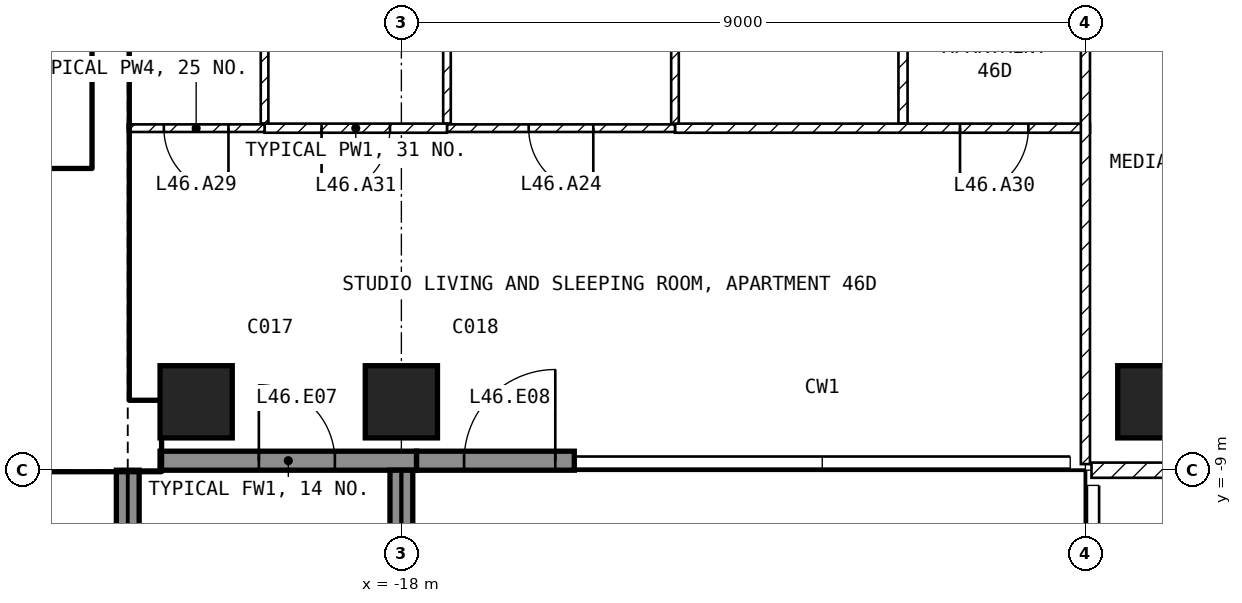
"""IFC4 building model, lengths in metres.
Left out: names, types, materials, properties, quantities, classifications, styles, units other than length and angle.
Written with IfcOpenShell. Run it as: python <this file> out.ifc"""

import sys

from ifc_helpers import new_model, si_unit, direction, frame, frame_2d, origin, origin_2d, place, context, subcontext, project, spatial, rectangle, extrude, element, fill, save


model = new_model("IFC4")
c1 = context("Model", 3, precision=1e-05, world=origin(), true_north=direction((0.0, 1.0)))
c2 = subcontext(c1, "Body", "Model", "MODEL_VIEW")
j1 = project(units=[si_unit("LENGTHUNIT", "METRE"), si_unit("PLANEANGLEUNIT", "RADIAN")], contexts=[c1])
p1 = place(None, origin())
s1 = spatial("IfcSite", under=j1, at=p1, CompositionType="ELEMENT")
p2 = place(p1, origin())
s2 = spatial("IfcBuilding", under=s1, at=p2, CompositionType="ELEMENT")
p3 = place(p2, frame((0.0, 0.0, 187.6)))
s3 = spatial("IfcBuildingStorey", under=s2, at=p3, CompositionType="ELEMENT", Elevation=187.6)
for number, where, z_axis, x_axis in (
    (1, (-20.7, -8.1, -0.25), (0.0, 0.0, 1.0), (1.0, 0.0, 0.0)),
    (2, (-18.0, -8.1, -0.25), (0.0, 0.0, 1.0), (1.0, 0.0, 0.0)),
    (3, (-8.1, -8.1, -0.25), (0.0, 0.0, 1.0), (1.0, 0.0, 0.0)),
):
    element("IfcColumn", number, at=place(p3, frame(where, z_axis=z_axis, x_axis=x_axis)), inside=s3, PredefinedType="COLUMN", context=c2, shape_type="SweptSolid", body=[
        extrude(rectangle(XDim=0.95, YDim=0.95, at=origin_2d()), origin(), (0.0, 0.0, 1.0), 3.5),
    ])
p4 = place(p3, frame((-21.175, -8.875, 0.0), z_axis=(0.0, 0.0, 1.0), x_axis=(1.0, 0.0, 0.0)))
e4 = element("IfcWall", 4, at=p4, inside=s3, PredefinedType="SOLIDWALL", context=c2, shape_type="SweptSolid", body=[
    extrude(rectangle(XDim=3.375, YDim=0.25, at=frame_2d((1.688, 0.0))), origin(), (0.0, 0.0, 1.0), 3.25),
])
p5 = place(p4, frame((1.3, 0.0, 0.0)))
e5 = element("IfcOpeningElement", 5, at=p5, cuts=e4, PredefinedType="OPENING", context=c2, shape_type="SweptSolid", body=[
    extrude(rectangle(XDim=1.0, YDim=2.4, at=frame_2d((0.5, 1.2))), frame((0.0, 0.135, 0.0), z_axis=(0.0, -1.0, 0.0), x_axis=(1.0, 0.0, 0.0)), (0.0, 0.0, 1.0), 0.27),
])
p6 = place(p3, frame((-17.8, -8.875, 0.0), z_axis=(0.0, 0.0, 1.0), x_axis=(1.0, 0.0, 0.0)))
e6 = element("IfcWall", 6, at=p6, inside=s3, PredefinedType="SOLIDWALL", context=c2, shape_type="SweptSolid", body=[
    extrude(rectangle(XDim=2.075, YDim=0.25, at=frame_2d((1.038, 0.0))), origin(), (0.0, 0.0, 1.0), 3.25),
])
p7 = place(p6, frame((0.625, 0.0, 0.0)))
e7 = element("IfcOpeningElement", 7, at=p7, cuts=e6, PredefinedType="OPENING", context=c2, shape_type="SweptSolid", body=[
    extrude(rectangle(XDim=1.2, YDim=2.4, at=frame_2d((0.6, 1.2))), frame((0.0, 0.135, 0.0), z_axis=(0.0, -1.0, 0.0), x_axis=(1.0, 0.0, 0.0)), (0.0, 0.0, 1.0), 0.27),
])
for number, where, z_axis, x_axis in (
    (8, (-21.6, -9.0, 0.0), (0.0, 0.0, 1.0), (0.0, -1.0, 0.0)),
    (9, (-18.0, -9.0, 0.0), (0.0, 0.0, 1.0), (0.0, -1.0, 0.0)),
):
    element("IfcWall", number, at=place(p3, frame(where, z_axis=z_axis, x_axis=x_axis)), inside=s3, PredefinedType="SOLIDWALL", context=c2, shape_type="SweptSolid", body=[
        extrude(rectangle(XDim=2.7, YDim=0.3, at=frame_2d((1.35, 0.0))), origin(), (0.0, 0.0, 1.0), 3.25),
    ])
p8 = place(p3, frame((-30.2, -8.55, 0.0), z_axis=(0.0, 0.0, 1.0), x_axis=(1.0, 0.0, 0.0)))
e10 = element("IfcWall", 10, at=p8, inside=s3, PredefinedType="SHEAR", context=c2, shape_type="SweptSolid", body=[
    extrude(rectangle(XDim=9.025, YDim=0.9, at=frame_2d((4.512, 0.0))), origin(), (0.0, 0.0, 1.0), 3.25),
])
p9 = place(p3, frame((-21.825, -8.1, 0.0), z_axis=(0.0, 0.0, 1.0), x_axis=(0.0, 1.0, 0.0)))
e11 = element("IfcWall", 11, at=p9, inside=s3, PredefinedType="SHEAR", context=c2, shape_type="SweptSolid", body=[
    extrude(rectangle(XDim=6.9, YDim=0.45, at=frame_2d((3.45, 0.0))), origin(), (0.0, 0.0, 1.0), 3.25),
])
p10 = place(p3, frame((-28.35, -5.15, 0.0), z_axis=(0.0, 0.0, 1.0), x_axis=(1.0, 0.0, 0.0)))
e12 = element("IfcWall", 12, at=p10, inside=s3, PredefinedType="SOLIDWALL", context=c2, shape_type="SweptSolid", body=[
    extrude(rectangle(XDim=6.3, YDim=0.2, at=frame_2d((3.15, 0.0))), origin(), (0.0, 0.0, 1.0), 3.25),
])
p11 = place(p10, frame((5.1, 0.0, 0.0)))
e13 = element("IfcOpeningElement", 13, at=p11, cuts=e12, PredefinedType="OPENING", context=c2, shape_type="SweptSolid", body=[
    extrude(rectangle(XDim=1.0, YDim=2.1, at=frame_2d((0.5, 1.05))), frame((0.0, 0.11, 0.0), z_axis=(0.0, -1.0, 0.0), x_axis=(1.0, 0.0, 0.0)), (0.0, 0.0, 1.0), 0.22),
])
p12 = place(p3, frame((8.92, -9.0, 0.0), z_axis=(0.0, 0.0, 1.0), x_axis=(-1.0, 0.0, 0.0)))
e14 = element("IfcWall", 14, at=p12, inside=s3, PredefinedType="PARTITIONING", context=c2, shape_type="SweptSolid", body=[
    extrude(rectangle(XDim=17.84, YDim=0.2, at=frame_2d((8.92, 0.0))), origin(), (0.0, 0.0, 1.0), 3.25),
])
p13 = place(p12, frame((8.42, 0.0, 0.0)))
e15 = element("IfcOpeningElement", 15, at=p13, cuts=e14, PredefinedType="OPENING", context=c2, shape_type="SweptSolid", body=[
    extrude(rectangle(XDim=1.0, YDim=2.1, at=frame_2d((0.5, 1.05))), frame((0.0, 0.11, 0.0), z_axis=(0.0, -1.0, 0.0), x_axis=(1.0, 0.0, 0.0)), (0.0, 0.0, 1.0), 0.22),
])
p14 = place(p3, frame((-11.4, -4.44, 0.0), z_axis=(0.0, 0.0, 1.0), x_axis=(0.0, 1.0, 0.0)))
e16 = element("IfcWall", 16, at=p14, inside=s3, PredefinedType="PARTITIONING", context=c2, shape_type="SweptSolid", body=[
    extrude(rectangle(XDim=3.14, YDim=0.12, at=frame_2d((1.57, 0.0))), origin(), (0.0, 0.0, 1.0), 3.25),
])
p15 = place(p14, frame((1.12, 0.0, 0.0)))
e17 = element("IfcOpeningElement", 17, at=p15, cuts=e16, PredefinedType="OPENING", context=c2, shape_type="SweptSolid", body=[
    extrude(rectangle(XDim=0.9, YDim=2.1, at=frame_2d((0.45, 1.05))), frame((0.0, 0.07, 0.0), z_axis=(0.0, -1.0, 0.0), x_axis=(1.0, 0.0, 0.0)), (0.0, 0.0, 1.0), 0.14),
])
p16 = place(p3, frame((-8.94, -4.5, 0.0), z_axis=(0.0, 0.0, 1.0), x_axis=(-1.0, 0.0, 0.0)))
e18 = element("IfcWall", 18, at=p16, inside=s3, PredefinedType="PARTITIONING", context=c2, shape_type="SweptSolid", body=[
    extrude(rectangle(XDim=5.46, YDim=0.12, at=frame_2d((2.73, 0.0))), origin(), (0.0, 0.0, 1.0), 3.25),
])
p17 = place(p16, frame((0.81, 0.0, 0.0)))
e19 = element("IfcOpeningElement", 19, at=p17, cuts=e18, PredefinedType="OPENING", context=c2, shape_type="SweptSolid", body=[
    extrude(rectangle(XDim=0.9, YDim=2.1, at=frame_2d((0.45, 1.05))), frame((0.0, 0.07, 0.0), z_axis=(0.0, -1.0, 0.0), x_axis=(1.0, 0.0, 0.0)), (0.0, 0.0, 1.0), 0.14),
])
p18 = place(p3, frame((-9.0, -1.3, 0.0), z_axis=(0.0, 0.0, 1.0), x_axis=(0.0, -1.0, 0.0)))
e20 = element("IfcWall", 20, at=p18, inside=s3, PredefinedType="PARTITIONING", context=c2, shape_type="SweptSolid", body=[
    extrude(rectangle(XDim=7.62, YDim=0.12, at=frame_2d((3.81, 0.0))), origin(), (0.0, 0.0, 1.0), 3.25),
])
p19 = place(p18, frame((1.15, 0.0, 0.0)))
e21 = element("IfcOpeningElement", 21, at=p19, cuts=e20, PredefinedType="OPENING", context=c2, shape_type="SweptSolid", body=[
    extrude(rectangle(XDim=0.9, YDim=2.1, at=frame_2d((0.45, 1.05))), frame((0.0, 0.07, 0.0), z_axis=(0.0, -1.0, 0.0), x_axis=(1.0, 0.0, 0.0)), (0.0, 0.0, 1.0), 0.14),
])
for number, where, z_axis, x_axis in (
    (22, (-14.4, -4.44, 0.0), (0.0, 0.0, 1.0), (0.0, 1.0, 0.0)),
    (23, (-17.4, -4.44, 0.0), (0.0, 0.0, 1.0), (0.0, 1.0, 0.0)),
):
    element("IfcWall", number, at=place(p3, frame(where, z_axis=z_axis, x_axis=x_axis)), inside=s3, PredefinedType="PARTITIONING", context=c2, shape_type="SweptSolid", body=[
        extrude(rectangle(XDim=3.14, YDim=0.1, at=frame_2d((1.57, 0.0))), origin(), (0.0, 0.0, 1.0), 3.25),
    ])
p20 = place(p3, frame((-14.4, -4.5, 0.0), z_axis=(0.0, 0.0, 1.0), x_axis=(-1.0, 0.0, 0.0)))
e24 = element("IfcWall", 24, at=p20, inside=s3, PredefinedType="PARTITIONING", context=c2, shape_type="SweptSolid", body=[
    extrude(rectangle(XDim=3.0, YDim=0.1, at=frame_2d((1.5, 0.0))), origin(), (0.0, 0.0, 1.0), 3.25),
])
p21 = place(p20, frame((1.075, 0.0, 0.0)))
e25 = element("IfcOpeningElement", 25, at=p21, cuts=e24, PredefinedType="OPENING", context=c2, shape_type="SweptSolid", body=[
    extrude(rectangle(XDim=0.85, YDim=2.1, at=frame_2d((0.425, 1.05))), frame((0.0, 0.06, 0.0), z_axis=(0.0, -1.0, 0.0), x_axis=(1.0, 0.0, 0.0)), (0.0, 0.0, 1.0), 0.12),
])
p22 = place(p3, frame((-19.8, -4.44, 0.0), z_axis=(0.0, 0.0, 1.0), x_axis=(0.0, 1.0, 0.0)))
e26 = element("IfcWall", 26, at=p22, inside=s3, PredefinedType="PARTITIONING", context=c2, shape_type="SweptSolid", body=[
    extrude(rectangle(XDim=3.14, YDim=0.1, at=frame_2d((1.57, 0.0))), origin(), (0.0, 0.0, 1.0), 3.25),
])
p23 = place(p3, frame((-17.4, -4.5, 0.0), z_axis=(0.0, 0.0, 1.0), x_axis=(-1.0, 0.0, 0.0)))
e27 = element("IfcWall", 27, at=p23, inside=s3, PredefinedType="PARTITIONING", context=c2, shape_type="SweptSolid", body=[
    extrude(rectangle(XDim=2.4, YDim=0.12, at=frame_2d((1.2, 0.0))), origin(), (0.0, 0.0, 1.0), 3.25),
])
p24 = place(p23, frame((0.75, 0.0, 0.0)))
e28 = element("IfcOpeningElement", 28, at=p24, cuts=e27, PredefinedType="OPENING", context=c2, shape_type="SweptSolid", body=[
    extrude(rectangle(XDim=0.9, YDim=2.1, at=frame_2d((0.45, 1.05))), frame((0.0, 0.07, 0.0), z_axis=(0.0, -1.0, 0.0), x_axis=(1.0, 0.0, 0.0)), (0.0, 0.0, 1.0), 0.14),
])
p25 = place(p3, frame((-19.8, -4.5, 0.0), z_axis=(0.0, 0.0, 1.0), x_axis=(-1.0, 0.0, 0.0)))
e29 = element("IfcWall", 29, at=p25, inside=s3, PredefinedType="PARTITIONING", context=c2, shape_type="SweptSolid", body=[
    extrude(rectangle(XDim=1.8, YDim=0.1, at=frame_2d((0.9, 0.0))), origin(), (0.0, 0.0, 1.0), 3.25),
])
p26 = place(p25, frame((0.475, 0.0, 0.0)))
e30 = element("IfcOpeningElement", 30, at=p26, cuts=e29, PredefinedType="OPENING", context=c2, shape_type="SweptSolid", body=[
    extrude(rectangle(XDim=0.85, YDim=2.1, at=frame_2d((0.425, 1.05))), frame((0.0, 0.06, 0.0), z_axis=(0.0, -1.0, 0.0), x_axis=(1.0, 0.0, 0.0)), (0.0, 0.0, 1.0), 0.12),
])
p27 = place(p5, origin())
e31 = element("IfcDoor", 31, at=p27, inside=s3, OperationType="SINGLE_SWING_LEFT", PredefinedType="DOOR", context=c2, shape_type="SweptSolid", body=[
    extrude(rectangle(XDim=1.0, YDim=2.4, at=frame_2d((0.5, 1.2))), frame((0.0, 0.025, 0.0), z_axis=(0.0, -1.0, 0.0), x_axis=(1.0, 0.0, 0.0)), (0.0, 0.0, 1.0), 0.05),
])
fill(e5, e31)
p28 = place(p7, origin())
e32 = element("IfcDoor", 32, at=p28, inside=s3, OperationType="SINGLE_SWING_RIGHT", PredefinedType="DOOR", context=c2, shape_type="SweptSolid", body=[
    extrude(rectangle(XDim=1.2, YDim=2.4, at=frame_2d((0.6, 1.2))), frame((0.0, 0.025, 0.0), z_axis=(0.0, -1.0, 0.0), x_axis=(1.0, 0.0, 0.0)), (0.0, 0.0, 1.0), 0.05),
])
fill(e7, e32)
p29 = place(p11, origin())
e33 = element("IfcDoor", 33, at=p29, inside=s3, OperationType="SINGLE_SWING_LEFT", PredefinedType="DOOR", context=c2, shape_type="SweptSolid", body=[
    extrude(rectangle(XDim=1.0, YDim=2.1, at=frame_2d((0.5, 1.05))), frame((0.0, 0.025, 0.0), z_axis=(0.0, -1.0, 0.0), x_axis=(1.0, 0.0, 0.0)), (0.0, 0.0, 1.0), 0.05),
])
fill(e13, e33)
p30 = place(p21, origin())
e34 = element("IfcDoor", 34, at=p30, inside=s3, OperationType="SINGLE_SWING_LEFT", PredefinedType="DOOR", context=c2, shape_type="SweptSolid", body=[
    extrude(rectangle(XDim=0.85, YDim=2.1, at=frame_2d((0.425, 1.05))), frame((0.0, 0.025, 0.0), z_axis=(0.0, -1.0, 0.0), x_axis=(1.0, 0.0, 0.0)), (0.0, 0.0, 1.0), 0.05),
])
fill(e25, e34)
p31 = place(p26, origin())
e35 = element("IfcDoor", 35, at=p31, inside=s3, OperationType="SINGLE_SWING_LEFT", PredefinedType="DOOR", context=c2, shape_type="SweptSolid", body=[
    extrude(rectangle(XDim=0.85, YDim=2.1, at=frame_2d((0.425, 1.05))), frame((0.0, 0.025, 0.0), z_axis=(0.0, -1.0, 0.0), x_axis=(1.0, 0.0, 0.0)), (0.0, 0.0, 1.0), 0.05),
])
fill(e30, e35)
p32 = place(p17, origin())
e36 = element("IfcDoor", 36, at=p32, inside=s3, OperationType="SINGLE_SWING_RIGHT", PredefinedType="DOOR", context=c2, shape_type="SweptSolid", body=[
    extrude(rectangle(XDim=0.9, YDim=2.1, at=frame_2d((0.45, 1.05))), frame((0.0, 0.025, 0.0), z_axis=(0.0, -1.0, 0.0), x_axis=(1.0, 0.0, 0.0)), (0.0, 0.0, 1.0), 0.05),
])
fill(e19, e36)
p33 = place(p24, origin())
e37 = element("IfcDoor", 37, at=p33, inside=s3, OperationType="SINGLE_SWING_RIGHT", PredefinedType="DOOR", context=c2, shape_type="SweptSolid", body=[
    extrude(rectangle(XDim=0.9, YDim=2.1, at=frame_2d((0.45, 1.05))), frame((0.0, 0.025, 0.0), z_axis=(0.0, -1.0, 0.0), x_axis=(1.0, 0.0, 0.0)), (0.0, 0.0, 1.0), 0.05),
])
fill(e28, e37)
save(model, sys.argv[1])
